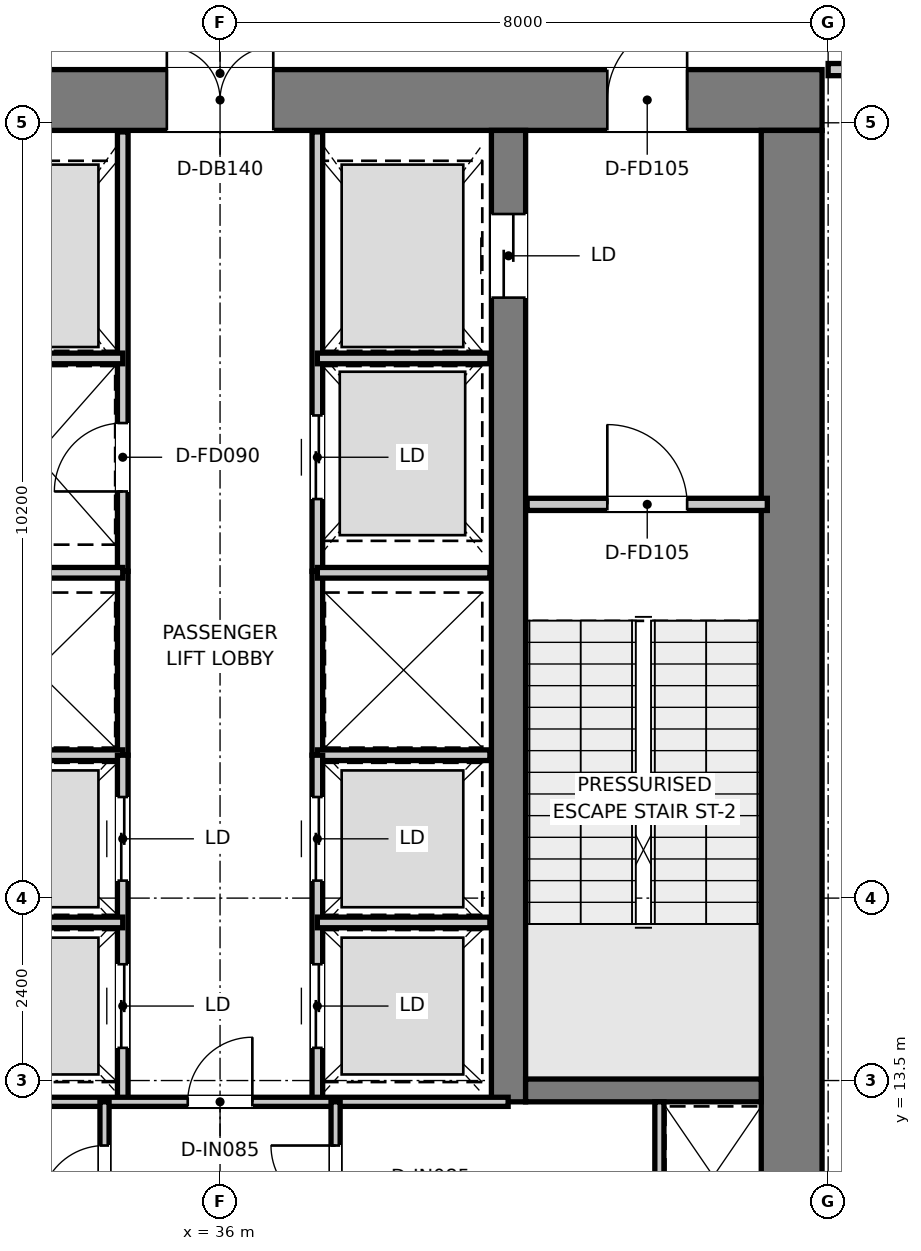
"""IFC4 building model, lengths in metres.
Left out: names, types, materials, properties, quantities, classifications, styles, units other than length and angle.
Written with IfcOpenShell. Run it as: python <this file> out.ifc"""

import sys

from ifc_helpers import new_model, si_unit, direction, frame, frame_2d, origin, place, context, subcontext, project, spatial, rectangle, extrude, element, fill, save


model = new_model("IFC4")
c1 = context("Model", 3, precision=1e-05, world=origin(), true_north=direction((0.0, 1.0)))
c2 = subcontext(c1, "Body", "Model", "MODEL_VIEW")
j1 = project(units=[si_unit("LENGTHUNIT", "METRE"), si_unit("PLANEANGLEUNIT", "RADIAN")], contexts=[c1])
p1 = place(None, origin())
s1 = spatial("IfcSite", under=j1, at=p1, CompositionType="ELEMENT")
p2 = place(p1, origin())
s2 = spatial("IfcBuilding", under=s1, at=p2, CompositionType="ELEMENT")
p3 = place(p2, frame((0.0, 0.0, 5.4)))
s3 = spatial("IfcBuildingStorey", under=s2, at=p3, CompositionType="ELEMENT", Elevation=5.4)
p4 = place(p3, frame((28.08, 26.4, 0.0), z_axis=(0.0, 0.0, 1.0), x_axis=(1.0, 0.0, 0.0)))
e1 = element("IfcWall", 1, at=p4, inside=s3, PredefinedType="SHEAR", context=c2, shape_type="SweptSolid", body=[
    extrude(rectangle(XDim=15.84, YDim=0.8, at=frame_2d((7.92, 0.0))), origin(), (0.0, 0.0, 1.0), 5.0),
])
p5 = place(p4, frame((7.22, 0.0, 0.0)))
e2 = element("IfcOpeningElement", 2, at=p5, cuts=e1, PredefinedType="OPENING", context=c2, shape_type="SweptSolid", body=[
    extrude(rectangle(XDim=1.4, YDim=2.2, at=frame_2d((0.7, 1.1))), frame((0.0, 0.41, 0.0), z_axis=(0.0, -1.0, 0.0), x_axis=(1.0, 0.0, 0.0)), (0.0, 0.0, 1.0), 0.82),
])
p6 = place(p4, frame((1.775, 0.0, 0.0)))
e3 = element("IfcOpeningElement", 3, at=p6, cuts=e1, PredefinedType="OPENING", context=c2, shape_type="SweptSolid", body=[
    extrude(rectangle(XDim=1.05, YDim=2.1, at=frame_2d((0.525, 1.05))), frame((0.0, 0.41, 0.0), z_axis=(0.0, -1.0, 0.0), x_axis=(1.0, 0.0, 0.0)), (0.0, 0.0, 1.0), 0.82),
])
p7 = place(p4, frame((13.015, 0.0, 0.0)))
e4 = element("IfcOpeningElement", 4, at=p7, cuts=e1, PredefinedType="OPENING", context=c2, shape_type="SweptSolid", body=[
    extrude(rectangle(XDim=1.05, YDim=2.1, at=frame_2d((0.525, 1.05))), frame((0.0, 0.41, 0.0), z_axis=(0.0, -1.0, 0.0), x_axis=(1.0, 0.0, 0.0)), (0.0, 0.0, 1.0), 0.82),
])
p8 = place(p3, frame((43.52, 11.3, 0.0), z_axis=(0.0, 0.0, 1.0), x_axis=(0.0, 1.0, 0.0)))
e5 = element("IfcWall", 5, at=p8, inside=s3, PredefinedType="SHEAR", context=c2, shape_type="SweptSolid", body=[
    extrude(rectangle(XDim=14.7, YDim=0.8, at=frame_2d((7.35, 0.0))), origin(), (0.0, 0.0, 1.0), 5.0),
])
p9 = place(p3, frame((39.795, 13.22, 0.0), z_axis=(0.0, 0.0, 1.0), x_axis=(0.0, 1.0, 0.0)))
e6 = element("IfcWall", 6, at=p9, inside=s3, PredefinedType="SHEAR", context=c2, shape_type="SweptSolid", body=[
    extrude(rectangle(XDim=12.78, YDim=0.45, at=frame_2d((6.39, 0.0))), origin(), (0.0, 0.0, 1.0), 5.0),
])
p10 = place(p9, frame((10.58, 0.0, 0.0)))
e7 = element("IfcOpeningElement", 7, at=p10, cuts=e6, PredefinedType="OPENING", context=c2, shape_type="SweptSolid", body=[
    extrude(rectangle(XDim=1.1, YDim=2.15, at=frame_2d((0.55, 1.075))), frame((0.0, 0.235, 0.0), z_axis=(0.0, -1.0, 0.0), x_axis=(1.0, 0.0, 0.0)), (0.0, 0.0, 1.0), 0.47),
])
p11 = place(p3, frame((40.02, 13.37, 0.0), z_axis=(0.0, 0.0, 1.0), x_axis=(1.0, 0.0, 0.0)))
e8 = element("IfcWall", 8, at=p11, inside=s3, PredefinedType="SHEAR", context=c2, shape_type="SweptSolid", body=[
    extrude(rectangle(XDim=3.1, YDim=0.3, at=frame_2d((1.55, 0.0))), origin(), (0.0, 0.0, 1.0), 5.0),
])
p12 = place(p3, frame((40.04, 21.08, 0.0), z_axis=(0.0, 0.0, 1.0), x_axis=(1.0, 0.0, 0.0)))
e9 = element("IfcWall", 9, at=p12, inside=s3, PredefinedType="PARTITIONING", context=c2, shape_type="SweptSolid", body=[
    extrude(rectangle(XDim=3.16, YDim=0.16, at=frame_2d((1.58, 0.0))), origin(), (0.0, 0.0, 1.0), 4.7),
])
p13 = place(p12, frame((1.055, 0.0, 0.0)))
e10 = element("IfcOpeningElement", 10, at=p13, cuts=e9, PredefinedType="OPENING", context=c2, shape_type="SweptSolid", body=[
    extrude(rectangle(XDim=1.05, YDim=2.1, at=frame_2d((0.525, 1.05))), frame((0.0, 0.09, 0.0), z_axis=(0.0, -1.0, 0.0), x_axis=(1.0, 0.0, 0.0)), (0.0, 0.0, 1.0), 0.18),
])
p14 = place(p3, frame((34.72, 20.2, 0.0), z_axis=(0.0, 0.0, 1.0), x_axis=(0.0, 1.0, 0.0)))
e11 = element("IfcWall", 11, at=p14, inside=s3, PredefinedType="PARTITIONING", context=c2, shape_type="SweptSolid", body=[
    extrude(rectangle(XDim=5.78, YDim=0.14, at=frame_2d((2.89, 0.0))), origin(), (0.0, 0.0, 1.0), 3.5),
])
p15 = place(p14, frame((1.05, 0.0, 0.0)))
e12 = element("IfcOpeningElement", 12, at=p15, cuts=e11, PredefinedType="OPENING", context=c2, shape_type="SweptSolid", body=[
    extrude(rectangle(XDim=0.9, YDim=2.1, at=frame_2d((0.45, 1.05))), frame((0.0, 0.08, 0.0), z_axis=(0.0, -1.0, 0.0), x_axis=(1.0, 0.0, 0.0)), (0.0, 0.0, 1.0), 0.16),
])
p16 = place(p3, frame((37.28, 20.2, 0.0), z_axis=(0.0, 0.0, 1.0), x_axis=(0.0, 1.0, 0.0)))
e13 = element("IfcWall", 13, at=p16, inside=s3, PredefinedType="PARTITIONING", context=c2, shape_type="SweptSolid", body=[
    extrude(rectangle(XDim=5.78, YDim=0.14, at=frame_2d((2.89, 0.0))), origin(), (0.0, 0.0, 1.0), 3.5),
])
p17 = place(p16, frame((0.95, 0.0, 0.0)))
e14 = element("IfcOpeningElement", 14, at=p17, cuts=e13, PredefinedType="OPENING", context=c2, shape_type="SweptSolid", body=[
    extrude(rectangle(XDim=1.1, YDim=2.15, at=frame_2d((0.55, 1.075))), frame((0.0, 0.08, 0.0), z_axis=(0.0, -1.0, 0.0), x_axis=(1.0, 0.0, 0.0)), (0.0, 0.0, 1.0), 0.16),
])
for number, where, z_axis, x_axis in (
    (15, (32.45, 23.0, 0.0), (0.0, 0.0, 1.0), (1.0, 0.0, 0.0)),
    (16, (37.28, 23.0, 0.0), (0.0, 0.0, 1.0), (1.0, 0.0, 0.0)),
):
    element("IfcWall", number, at=place(p3, frame(where, z_axis=z_axis, x_axis=x_axis)), inside=s3, PredefinedType="PARTITIONING", context=c2, shape_type="SweptSolid", body=[
        extrude(rectangle(XDim=2.27, YDim=0.14, at=frame_2d((1.135, 0.0))), origin(), (0.0, 0.0, 1.0), 3.5),
    ])
for number, where, z_axis, x_axis in (
    (17, (34.72, 17.78, 0.0), (0.0, 0.0, 1.0), (0.0, 1.0, 0.0)),
    (18, (37.28, 17.78, 0.0), (0.0, 0.0, 1.0), (0.0, 1.0, 0.0)),
):
    element("IfcWall", number, at=place(p3, frame(where, z_axis=z_axis, x_axis=x_axis)), inside=s3, PredefinedType="PARTITIONING", context=c2, shape_type="SweptSolid", body=[
        extrude(rectangle(XDim=2.42, YDim=0.14, at=frame_2d((1.21, 0.0))), origin(), (0.0, 0.0, 1.0), 4.7),
    ])
for number, where, z_axis, x_axis in (
    (19, (32.45, 17.78, 0.0), (0.0, 0.0, 1.0), (1.0, 0.0, 0.0)),
    (20, (32.45, 20.18, 0.0), (0.0, 0.0, 1.0), (1.0, 0.0, 0.0)),
    (21, (37.28, 17.78, 0.0), (0.0, 0.0, 1.0), (1.0, 0.0, 0.0)),
    (22, (37.28, 20.18, 0.0), (0.0, 0.0, 1.0), (1.0, 0.0, 0.0)),
):
    element("IfcWall", number, at=place(p3, frame(where, z_axis=z_axis, x_axis=x_axis)), inside=s3, PredefinedType="PARTITIONING", context=c2, shape_type="SweptSolid", body=[
        extrude(rectangle(XDim=2.27, YDim=0.14, at=frame_2d((1.135, 0.0))), origin(), (0.0, 0.0, 1.0), 4.7),
    ])
p18 = place(p3, frame((34.72, 13.22, 0.0), z_axis=(0.0, 0.0, 1.0), x_axis=(0.0, 1.0, 0.0)))
e23 = element("IfcWall", 23, at=p18, inside=s3, PredefinedType="PARTITIONING", context=c2, shape_type="SweptSolid", body=[
    extrude(rectangle(XDim=4.56, YDim=0.14, at=frame_2d((2.28, 0.0))), origin(), (0.0, 0.0, 1.0), 4.7),
])
p19 = place(p18, frame((0.71, 0.0, 0.0)))
e24 = element("IfcOpeningElement", 24, at=p19, cuts=e23, PredefinedType="OPENING", context=c2, shape_type="SweptSolid", body=[
    extrude(rectangle(XDim=1.1, YDim=2.15, at=frame_2d((0.55, 1.075))), frame((0.0, 0.08, 0.0), z_axis=(0.0, -1.0, 0.0), x_axis=(1.0, 0.0, 0.0)), (0.0, 0.0, 1.0), 0.16),
])
p20 = place(p18, frame((2.91, 0.0, 0.0)))
e25 = element("IfcOpeningElement", 25, at=p20, cuts=e23, PredefinedType="OPENING", context=c2, shape_type="SweptSolid", body=[
    extrude(rectangle(XDim=1.1, YDim=2.15, at=frame_2d((0.55, 1.075))), frame((0.0, 0.08, 0.0), z_axis=(0.0, -1.0, 0.0), x_axis=(1.0, 0.0, 0.0)), (0.0, 0.0, 1.0), 0.16),
])
p21 = place(p3, frame((32.45, 15.58, 0.0), z_axis=(0.0, 0.0, 1.0), x_axis=(1.0, 0.0, 0.0)))
e26 = element("IfcWall", 26, at=p21, inside=s3, PredefinedType="PARTITIONING", context=c2, shape_type="SweptSolid", body=[
    extrude(rectangle(XDim=2.27, YDim=0.14, at=frame_2d((1.135, 0.0))), origin(), (0.0, 0.0, 1.0), 4.7),
])
p22 = place(p3, frame((37.28, 13.22, 0.0), z_axis=(0.0, 0.0, 1.0), x_axis=(0.0, 1.0, 0.0)))
e27 = element("IfcWall", 27, at=p22, inside=s3, PredefinedType="PARTITIONING", context=c2, shape_type="SweptSolid", body=[
    extrude(rectangle(XDim=4.56, YDim=0.14, at=frame_2d((2.28, 0.0))), origin(), (0.0, 0.0, 1.0), 4.7),
])
p23 = place(p22, frame((0.71, 0.0, 0.0)))
e28 = element("IfcOpeningElement", 28, at=p23, cuts=e27, PredefinedType="OPENING", context=c2, shape_type="SweptSolid", body=[
    extrude(rectangle(XDim=1.1, YDim=2.15, at=frame_2d((0.55, 1.075))), frame((0.0, 0.08, 0.0), z_axis=(0.0, -1.0, 0.0), x_axis=(1.0, 0.0, 0.0)), (0.0, 0.0, 1.0), 0.16),
])
p24 = place(p22, frame((2.91, 0.0, 0.0)))
e29 = element("IfcOpeningElement", 29, at=p24, cuts=e27, PredefinedType="OPENING", context=c2, shape_type="SweptSolid", body=[
    extrude(rectangle(XDim=1.1, YDim=2.15, at=frame_2d((0.55, 1.075))), frame((0.0, 0.08, 0.0), z_axis=(0.0, -1.0, 0.0), x_axis=(1.0, 0.0, 0.0)), (0.0, 0.0, 1.0), 0.16),
])
p25 = place(p3, frame((37.28, 15.58, 0.0), z_axis=(0.0, 0.0, 1.0), x_axis=(1.0, 0.0, 0.0)))
e30 = element("IfcWall", 30, at=p25, inside=s3, PredefinedType="PARTITIONING", context=c2, shape_type="SweptSolid", body=[
    extrude(rectangle(XDim=2.27, YDim=0.14, at=frame_2d((1.135, 0.0))), origin(), (0.0, 0.0, 1.0), 4.7),
])
p26 = place(p3, frame((41.78, 11.25, 0.0), z_axis=(0.0, 0.0, 1.0), x_axis=(0.0, 1.0, 0.0)))
e31 = element("IfcWall", 31, at=p26, inside=s3, PredefinedType="PARTITIONING", context=c2, shape_type="SweptSolid", body=[
    extrude(rectangle(XDim=1.97, YDim=0.12, at=frame_2d((0.985, 0.0))), origin(), (0.0, 0.0, 1.0), 4.7),
])
p27 = place(p3, frame((32.21, 13.22, 0.0), z_axis=(0.0, 0.0, 1.0), x_axis=(1.0, 0.0, 0.0)))
e32 = element("IfcWall", 32, at=p27, inside=s3, PredefinedType="PARTITIONING", context=c2, shape_type="SweptSolid", body=[
    extrude(rectangle(XDim=7.58, YDim=0.12, at=frame_2d((3.79, 0.0))), origin(), (0.0, 0.0, 1.0), 4.7),
])
p28 = place(p27, frame((3.365, 0.0, 0.0)))
e33 = element("IfcOpeningElement", 33, at=p28, cuts=e32, PredefinedType="OPENING", context=c2, shape_type="SweptSolid", body=[
    extrude(rectangle(XDim=0.85, YDim=2.1, at=frame_2d((0.425, 1.05))), frame((0.0, 0.07, 0.0), z_axis=(0.0, -1.0, 0.0), x_axis=(1.0, 0.0, 0.0)), (0.0, 0.0, 1.0), 0.14),
])
p29 = place(p3, frame((34.48, 11.25, 0.0), z_axis=(0.0, 0.0, 1.0), x_axis=(0.0, 1.0, 0.0)))
e34 = element("IfcWall", 34, at=p29, inside=s3, PredefinedType="PARTITIONING", context=c2, shape_type="SweptSolid", body=[
    extrude(rectangle(XDim=1.97, YDim=0.12, at=frame_2d((0.985, 0.0))), origin(), (0.0, 0.0, 1.0), 4.7),
])
p30 = place(p29, frame((0.545, 0.0, 0.0)))
e35 = element("IfcOpeningElement", 35, at=p30, cuts=e34, PredefinedType="OPENING", context=c2, shape_type="SweptSolid", body=[
    extrude(rectangle(XDim=0.85, YDim=2.1, at=frame_2d((0.425, 1.05))), frame((0.0, 0.07, 0.0), z_axis=(0.0, -1.0, 0.0), x_axis=(1.0, 0.0, 0.0)), (0.0, 0.0, 1.0), 0.14),
])
p31 = place(p3, frame((37.52, 11.25, 0.0), z_axis=(0.0, 0.0, 1.0), x_axis=(0.0, 1.0, 0.0)))
e36 = element("IfcWall", 36, at=p31, inside=s3, PredefinedType="PARTITIONING", context=c2, shape_type="SweptSolid", body=[
    extrude(rectangle(XDim=1.97, YDim=0.12, at=frame_2d((0.985, 0.0))), origin(), (0.0, 0.0, 1.0), 4.7),
])
p32 = place(p31, frame((0.545, 0.0, 0.0)))
e37 = element("IfcOpeningElement", 37, at=p32, cuts=e36, PredefinedType="OPENING", context=c2, shape_type="SweptSolid", body=[
    extrude(rectangle(XDim=0.85, YDim=2.1, at=frame_2d((0.425, 1.05))), frame((0.0, 0.07, 0.0), z_axis=(0.0, -1.0, 0.0), x_axis=(1.0, 0.0, 0.0)), (0.0, 0.0, 1.0), 0.14),
])
p33 = place(p3, frame((44.0, 26.8, 0.0), z_axis=(0.0, 0.0, 1.0), x_axis=(1.0, 0.0, 0.0)))
e38 = element("IfcWall", 38, at=p33, inside=s3, PredefinedType="PARTITIONING", context=c2, shape_type="SweptSolid", body=[
    extrude(rectangle(XDim=10.08, YDim=0.16, at=frame_2d((5.04, 0.0))), origin(), (0.0, 0.0, 1.0), 3.9),
])
p34 = place(p33, frame((4.3, 0.0, 0.0)))
e39 = element("IfcOpeningElement", 39, at=p34, cuts=e38, PredefinedType="OPENING", context=c2, shape_type="SweptSolid", body=[
    extrude(rectangle(XDim=1.4, YDim=2.2, at=frame_2d((0.7, 1.1))), frame((0.0, 0.09, 0.0), z_axis=(0.0, -1.0, 0.0), x_axis=(1.0, 0.0, 0.0)), (0.0, 0.0, 1.0), 0.18),
])
p35 = place(p13, origin())
e40 = element("IfcDoor", 40, at=p35, inside=s3, OperationType="SINGLE_SWING_LEFT", PredefinedType="DOOR", context=c2, shape_type="SweptSolid", body=[
    extrude(rectangle(XDim=1.05, YDim=2.1, at=frame_2d((0.525, 1.05))), frame((0.0, 0.025, 0.0), z_axis=(0.0, -1.0, 0.0), x_axis=(1.0, 0.0, 0.0)), (0.0, 0.0, 1.0), 0.05),
])
fill(e10, e40)
p36 = place(p5, origin())
e41 = element("IfcDoor", 41, at=p36, inside=s3, OperationType="DOUBLE_DOOR_SINGLE_SWING", PredefinedType="DOOR", context=c2, shape_type="SweptSolid", body=[
    extrude(rectangle(XDim=1.4, YDim=2.2, at=frame_2d((0.7, 1.1))), frame((0.0, 0.025, 0.0), z_axis=(0.0, -1.0, 0.0), x_axis=(1.0, 0.0, 0.0)), (0.0, 0.0, 1.0), 0.05),
])
fill(e2, e41)
p37 = place(p7, origin())
e42 = element("IfcDoor", 42, at=p37, inside=s3, OperationType="SINGLE_SWING_RIGHT", PredefinedType="DOOR", context=c2, shape_type="SweptSolid", body=[
    extrude(rectangle(XDim=1.05, YDim=2.1, at=frame_2d((0.525, 1.05))), frame((0.0, 0.025, 0.0), z_axis=(0.0, -1.0, 0.0), x_axis=(1.0, 0.0, 0.0)), (0.0, 0.0, 1.0), 0.05),
])
fill(e4, e42)
p38 = place(p10, origin())
e43 = element("IfcDoor", 43, at=p38, inside=s3, OperationType="DOUBLE_DOOR_SLIDING", PredefinedType="DOOR", context=c2, shape_type="SweptSolid", body=[
    extrude(rectangle(XDim=1.1, YDim=2.15, at=frame_2d((0.55, 1.075))), frame((0.0, 0.025, 0.0), z_axis=(0.0, -1.0, 0.0), x_axis=(1.0, 0.0, 0.0)), (0.0, 0.0, 1.0), 0.05),
])
fill(e7, e43)
p39 = place(p15, origin())
e44 = element("IfcDoor", 44, at=p39, inside=s3, OperationType="SINGLE_SWING_LEFT", PredefinedType="DOOR", context=c2, shape_type="SweptSolid", body=[
    extrude(rectangle(XDim=0.9, YDim=2.1, at=frame_2d((0.45, 1.05))), frame((0.0, 0.025, 0.0), z_axis=(0.0, -1.0, 0.0), x_axis=(1.0, 0.0, 0.0)), (0.0, 0.0, 1.0), 0.05),
])
fill(e12, e44)
p40 = place(p17, origin())
e45 = element("IfcDoor", 45, at=p40, inside=s3, OperationType="DOUBLE_DOOR_SLIDING", PredefinedType="DOOR", context=c2, shape_type="SweptSolid", body=[
    extrude(rectangle(XDim=1.1, YDim=2.15, at=frame_2d((0.55, 1.075))), frame((0.0, 0.025, 0.0), z_axis=(0.0, -1.0, 0.0), x_axis=(1.0, 0.0, 0.0)), (0.0, 0.0, 1.0), 0.05),
])
fill(e14, e45)
p41 = place(p19, origin())
e46 = element("IfcDoor", 46, at=p41, inside=s3, OperationType="DOUBLE_DOOR_SLIDING", PredefinedType="DOOR", context=c2, shape_type="SweptSolid", body=[
    extrude(rectangle(XDim=1.1, YDim=2.15, at=frame_2d((0.55, 1.075))), frame((0.0, 0.025, 0.0), z_axis=(0.0, -1.0, 0.0), x_axis=(1.0, 0.0, 0.0)), (0.0, 0.0, 1.0), 0.05),
])
fill(e24, e46)
p42 = place(p20, origin())
e47 = element("IfcDoor", 47, at=p42, inside=s3, OperationType="DOUBLE_DOOR_SLIDING", PredefinedType="DOOR", context=c2, shape_type="SweptSolid", body=[
    extrude(rectangle(XDim=1.1, YDim=2.15, at=frame_2d((0.55, 1.075))), frame((0.0, 0.025, 0.0), z_axis=(0.0, -1.0, 0.0), x_axis=(1.0, 0.0, 0.0)), (0.0, 0.0, 1.0), 0.05),
])
fill(e25, e47)
p43 = place(p23, origin())
e48 = element("IfcDoor", 48, at=p43, inside=s3, OperationType="DOUBLE_DOOR_SLIDING", PredefinedType="DOOR", context=c2, shape_type="SweptSolid", body=[
    extrude(rectangle(XDim=1.1, YDim=2.15, at=frame_2d((0.55, 1.075))), frame((0.0, 0.025, 0.0), z_axis=(0.0, -1.0, 0.0), x_axis=(1.0, 0.0, 0.0)), (0.0, 0.0, 1.0), 0.05),
])
fill(e28, e48)
p44 = place(p24, origin())
e49 = element("IfcDoor", 49, at=p44, inside=s3, OperationType="DOUBLE_DOOR_SLIDING", PredefinedType="DOOR", context=c2, shape_type="SweptSolid", body=[
    extrude(rectangle(XDim=1.1, YDim=2.15, at=frame_2d((0.55, 1.075))), frame((0.0, 0.025, 0.0), z_axis=(0.0, -1.0, 0.0), x_axis=(1.0, 0.0, 0.0)), (0.0, 0.0, 1.0), 0.05),
])
fill(e29, e49)
p45 = place(p28, origin())
e50 = element("IfcDoor", 50, at=p45, inside=s3, OperationType="SINGLE_SWING_RIGHT", PredefinedType="DOOR", context=c2, shape_type="SweptSolid", body=[
    extrude(rectangle(XDim=0.85, YDim=2.1, at=frame_2d((0.425, 1.05))), frame((0.0, 0.025, 0.0), z_axis=(0.0, -1.0, 0.0), x_axis=(1.0, 0.0, 0.0)), (0.0, 0.0, 1.0), 0.05),
])
fill(e33, e50)
p46 = place(p30, origin())
e51 = element("IfcDoor", 51, at=p46, inside=s3, OperationType="SINGLE_SWING_LEFT", PredefinedType="DOOR", context=c2, shape_type="SweptSolid", body=[
    extrude(rectangle(XDim=0.85, YDim=2.1, at=frame_2d((0.425, 1.05))), frame((0.0, 0.025, 0.0), z_axis=(0.0, -1.0, 0.0), x_axis=(1.0, 0.0, 0.0)), (0.0, 0.0, 1.0), 0.05),
])
fill(e35, e51)
p47 = place(p32, origin())
e52 = element("IfcDoor", 52, at=p47, inside=s3, OperationType="SINGLE_SWING_RIGHT", PredefinedType="DOOR", context=c2, shape_type="SweptSolid", body=[
    extrude(rectangle(XDim=0.85, YDim=2.1, at=frame_2d((0.425, 1.05))), frame((0.0, 0.025, 0.0), z_axis=(0.0, -1.0, 0.0), x_axis=(1.0, 0.0, 0.0)), (0.0, 0.0, 1.0), 0.05),
])
fill(e37, e52)
save(model, sys.argv[1])
